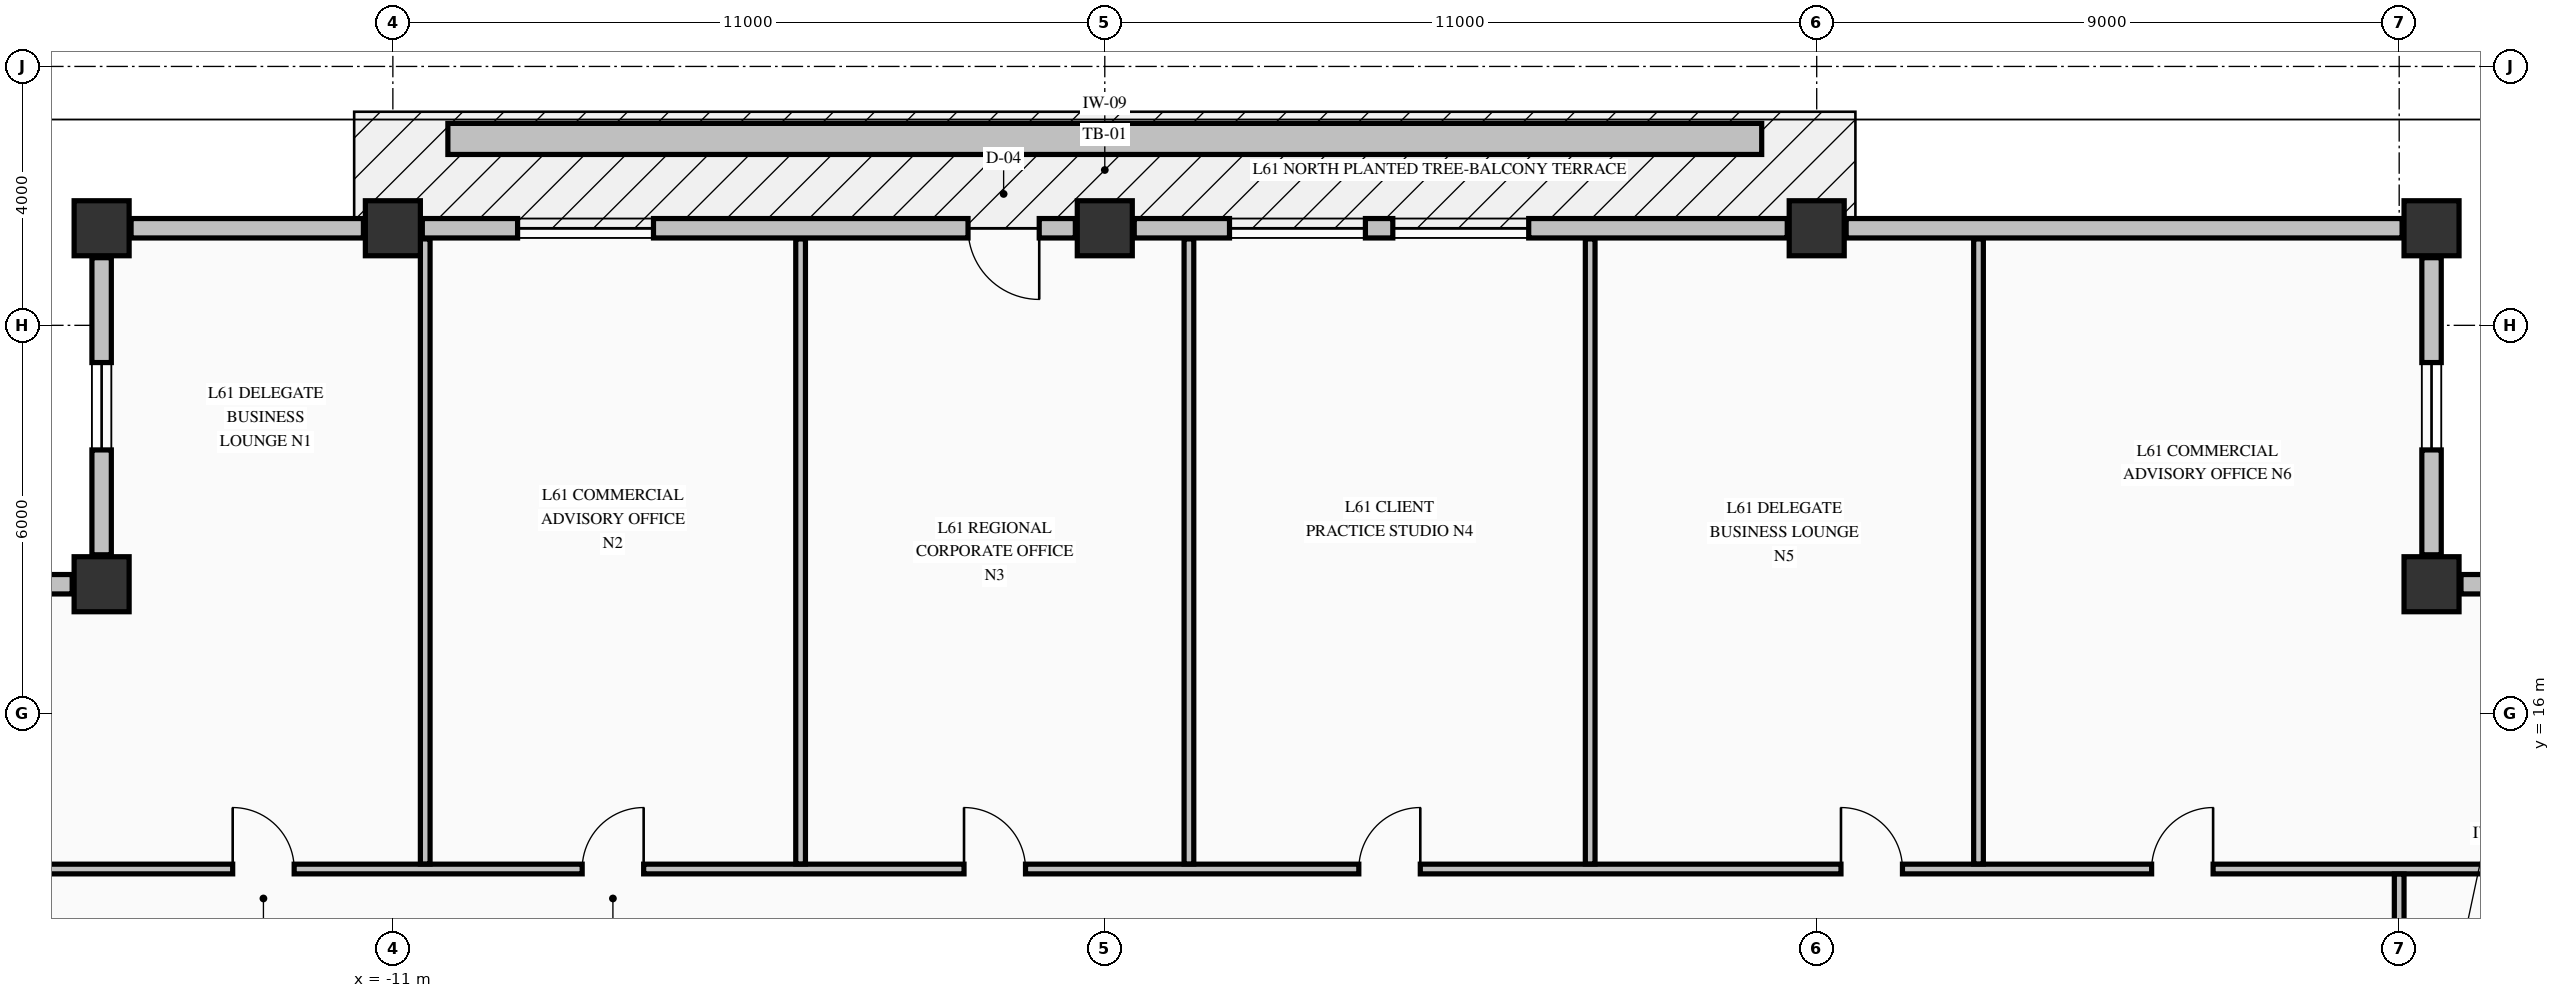
"""IFC4 building model, lengths in metres.
Left out: names, types, materials, properties, quantities, classifications, styles, units other than length and angle.
Written with IfcOpenShell. Run it as: python <this file> out.ifc"""

import sys

from ifc_helpers import new_model, si_unit, direction, frame, frame_2d, origin, origin_2d, place, context, subcontext, project, spatial, rectangle, extrude, element, fill, save


model = new_model("IFC4")
c1 = context("Model", 3, precision=1e-05, world=origin(), true_north=direction((0.0, 1.0)))
c2 = subcontext(c1, "Body", "Model", "MODEL_VIEW")
j1 = project(units=[si_unit("LENGTHUNIT", "METRE"), si_unit("PLANEANGLEUNIT", "RADIAN")], contexts=[c1])
p1 = place(None, origin())
s1 = spatial("IfcSite", under=j1, at=p1, CompositionType="ELEMENT")
p2 = place(p1, origin())
s2 = spatial("IfcBuilding", under=s1, at=p2, CompositionType="ELEMENT")
p3 = place(p2, frame((0.0, 0.0, 233.28)))
s3 = spatial("IfcBuildingStorey", under=s2, at=p3, CompositionType="ELEMENT", Elevation=233.28)
for number, where, z_axis, x_axis in (
    (1, (-15.5, 23.5, -0.25), (0.0, 0.0, 1.0), (1.0, 0.0, 0.0)),
    (2, (-11.0, 23.5, -0.25), (0.0, 0.0, 1.0), (1.0, 0.0, 0.0)),
    (3, (0.0, 23.5, -0.25), (0.0, 0.0, 1.0), (1.0, 0.0, 0.0)),
    (4, (11.0, 23.5, -0.25), (0.0, 0.0, 1.0), (1.0, 0.0, 0.0)),
    (5, (20.5, 23.5, -0.25), (0.0, 0.0, 1.0), (1.0, 0.0, 0.0)),
    (6, (20.5, 18.0, -0.25), (0.0, 0.0, 1.0), (1.0, 0.0, 0.0)),
    (7, (-15.5, 18.0, -0.25), (0.0, 0.0, 1.0), (1.0, 0.0, 0.0)),
):
    element("IfcColumn", number, at=place(p3, frame(where, z_axis=z_axis, x_axis=x_axis)), inside=s3, PredefinedType="COLUMN", context=c2, shape_type="SweptSolid", body=[
        extrude(rectangle(XDim=0.85, YDim=0.85, at=origin_2d()), origin(), (0.0, 0.0, 1.0), 3.23),
    ])
p4 = place(p3, frame((25.545, 18.0, 0.0), z_axis=(0.0, 0.0, 1.0), x_axis=(-1.0, 0.0, 0.0)))
e8 = element("IfcWall", 8, at=p4, inside=s3, PredefinedType="STANDARD", context=c2, shape_type="SweptSolid", body=[
    extrude(rectangle(XDim=4.59, YDim=0.3, at=frame_2d((2.295, 0.0))), origin(), (0.0, 0.0, 1.0), 2.372),
])
p5 = place(p4, frame((1.62, 0.0, 0.68)))
e9 = element("IfcOpeningElement", 9, at=p5, cuts=e8, PredefinedType="OPENING", context=c2, shape_type="SweptSolid", body=[
    extrude(rectangle(XDim=1.35, YDim=1.42, at=frame_2d((0.675, 0.71))), frame((0.0, 0.16, 0.0), z_axis=(0.0, -1.0, 0.0), x_axis=(1.0, 0.0, 0.0)), (0.0, 0.0, 1.0), 0.32),
])
p6 = place(p3, frame((20.5, 18.455, 0.0), z_axis=(0.0, 0.0, 1.0), x_axis=(0.0, 1.0, 0.0)))
e10 = element("IfcWall", 10, at=p6, inside=s3, PredefinedType="STANDARD", context=c2, shape_type="SweptSolid", body=[
    extrude(rectangle(XDim=4.59, YDim=0.3, at=frame_2d((2.295, 0.0))), origin(), (0.0, 0.0, 1.0), 2.372),
])
p7 = place(p6, frame((1.62, 0.0, 0.68)))
e11 = element("IfcOpeningElement", 11, at=p7, cuts=e10, PredefinedType="OPENING", context=c2, shape_type="SweptSolid", body=[
    extrude(rectangle(XDim=1.35, YDim=1.42, at=frame_2d((0.675, 0.71))), frame((0.0, 0.16, 0.0), z_axis=(0.0, -1.0, 0.0), x_axis=(1.0, 0.0, 0.0)), (0.0, 0.0, 1.0), 0.32),
])
p8 = place(p3, frame((-15.5, 23.045, 0.0), z_axis=(0.0, 0.0, 1.0), x_axis=(0.0, -1.0, 0.0)))
e12 = element("IfcWall", 12, at=p8, inside=s3, PredefinedType="STANDARD", context=c2, shape_type="SweptSolid", body=[
    extrude(rectangle(XDim=4.59, YDim=0.3, at=frame_2d((2.295, 0.0))), origin(), (0.0, 0.0, 1.0), 2.372),
])
p9 = place(p8, frame((1.62, 0.0, 0.68)))
e13 = element("IfcOpeningElement", 13, at=p9, cuts=e12, PredefinedType="OPENING", context=c2, shape_type="SweptSolid", body=[
    extrude(rectangle(XDim=1.35, YDim=1.42, at=frame_2d((0.675, 0.71))), frame((0.0, 0.16, 0.0), z_axis=(0.0, -1.0, 0.0), x_axis=(1.0, 0.0, 0.0)), (0.0, 0.0, 1.0), 0.32),
])
p10 = place(p3, frame((-15.955, 18.0, 0.0), z_axis=(0.0, 0.0, 1.0), x_axis=(-1.0, 0.0, 0.0)))
e14 = element("IfcWall", 14, at=p10, inside=s3, PredefinedType="STANDARD", context=c2, shape_type="SweptSolid", body=[
    extrude(rectangle(XDim=4.59, YDim=0.3, at=frame_2d((2.295, 0.0))), origin(), (0.0, 0.0, 1.0), 2.372),
])
p11 = place(p10, frame((1.62, 0.0, 0.68)))
e15 = element("IfcOpeningElement", 15, at=p11, cuts=e14, PredefinedType="OPENING", context=c2, shape_type="SweptSolid", body=[
    extrude(rectangle(XDim=1.35, YDim=1.42, at=frame_2d((0.675, 0.71))), frame((0.0, 0.16, 0.0), z_axis=(0.0, -1.0, 0.0), x_axis=(1.0, 0.0, 0.0)), (0.0, 0.0, 1.0), 0.32),
])
p12 = place(p3, frame((-11.455, 23.5, 0.0), z_axis=(0.0, 0.0, 1.0), x_axis=(-1.0, 0.0, 0.0)))
e16 = element("IfcWall", 16, at=p12, inside=s3, PredefinedType="STANDARD", context=c2, shape_type="SweptSolid", body=[
    extrude(rectangle(XDim=3.59, YDim=0.3, at=frame_2d((1.795, 0.0))), origin(), (0.0, 0.0, 1.0), 2.372),
])
p13 = place(p3, frame((-0.455, 23.5, 0.0), z_axis=(0.0, 0.0, 1.0), x_axis=(-1.0, 0.0, 0.0)))
e17 = element("IfcWall", 17, at=p13, inside=s3, PredefinedType="STANDARD", context=c2, shape_type="SweptSolid", body=[
    extrude(rectangle(XDim=10.09, YDim=0.3, at=frame_2d((5.045, 0.0))), origin(), (0.0, 0.0, 1.0), 2.372),
])
p14 = place(p13, frame((0.558, 0.0, 0.0)))
e18 = element("IfcOpeningElement", 18, at=p14, cuts=e17, PredefinedType="OPENING", context=c2, shape_type="SweptSolid", body=[
    extrude(rectangle(XDim=1.1, YDim=2.15, at=frame_2d((0.55, 1.075))), frame((0.0, 0.16, 0.0), z_axis=(0.0, -1.0, 0.0), x_axis=(1.0, 0.0, 0.0)), (0.0, 0.0, 1.0), 0.32),
])
p15 = place(p13, frame((6.518, 0.0, 0.7)))
e19 = element("IfcOpeningElement", 19, at=p15, cuts=e17, PredefinedType="OPENING", context=c2, shape_type="SweptSolid", body=[
    extrude(rectangle(XDim=2.1, YDim=1.5, at=frame_2d((1.05, 0.75))), frame((0.0, 0.16, 0.0), z_axis=(0.0, -1.0, 0.0), x_axis=(1.0, 0.0, 0.0)), (0.0, 0.0, 1.0), 0.32),
])
p16 = place(p3, frame((10.545, 23.5, 0.0), z_axis=(0.0, 0.0, 1.0), x_axis=(-1.0, 0.0, 0.0)))
e20 = element("IfcWall", 20, at=p16, inside=s3, PredefinedType="STANDARD", context=c2, shape_type="SweptSolid", body=[
    extrude(rectangle(XDim=10.09, YDim=0.3, at=frame_2d((5.045, 0.0))), origin(), (0.0, 0.0, 1.0), 2.372),
])
p17 = place(p16, frame((3.995, 0.0, 0.7)))
e21 = element("IfcOpeningElement", 21, at=p17, cuts=e20, PredefinedType="OPENING", context=c2, shape_type="SweptSolid", body=[
    extrude(rectangle(XDim=2.1, YDim=1.5, at=frame_2d((1.05, 0.75))), frame((0.0, 0.16, 0.0), z_axis=(0.0, -1.0, 0.0), x_axis=(1.0, 0.0, 0.0)), (0.0, 0.0, 1.0), 0.32),
])
p18 = place(p16, frame((6.518, 0.0, 0.7)))
e22 = element("IfcOpeningElement", 22, at=p18, cuts=e20, PredefinedType="OPENING", context=c2, shape_type="SweptSolid", body=[
    extrude(rectangle(XDim=2.1, YDim=1.5, at=frame_2d((1.05, 0.75))), frame((0.0, 0.16, 0.0), z_axis=(0.0, -1.0, 0.0), x_axis=(1.0, 0.0, 0.0)), (0.0, 0.0, 1.0), 0.32),
])
p19 = place(p3, frame((20.045, 23.5, 0.0), z_axis=(0.0, 0.0, 1.0), x_axis=(-1.0, 0.0, 0.0)))
e23 = element("IfcWall", 23, at=p19, inside=s3, PredefinedType="STANDARD", context=c2, shape_type="SweptSolid", body=[
    extrude(rectangle(XDim=8.59, YDim=0.3, at=frame_2d((4.295, 0.0))), origin(), (0.0, 0.0, 1.0), 2.372),
])
p20 = place(p3, frame((-20.075, 13.6, 0.0), z_axis=(0.0, 0.0, 1.0), x_axis=(1.0, 0.0, 0.0)))
e24 = element("IfcWall", 24, at=p20, inside=s3, PredefinedType="PARTITIONING", context=c2, shape_type="SweptSolid", body=[
    extrude(rectangle(XDim=45.91, YDim=0.15, at=frame_2d((22.955, 0.0))), origin(), (0.0, 0.0, 1.0), 2.98),
])
p21 = place(p20, frame((6.6, 0.0, 0.0)))
e25 = element("IfcOpeningElement", 25, at=p21, cuts=e24, PredefinedType="OPENING", context=c2, shape_type="SweptSolid", body=[
    extrude(rectangle(XDim=0.95, YDim=2.15, at=frame_2d((0.475, 1.075))), frame((0.0, 0.085, 0.0), z_axis=(0.0, -1.0, 0.0), x_axis=(1.0, 0.0, 0.0)), (0.0, 0.0, 1.0), 0.17),
])
p22 = place(p20, frame((12.0, 0.0, 0.0)))
e26 = element("IfcOpeningElement", 26, at=p22, cuts=e24, PredefinedType="OPENING", context=c2, shape_type="SweptSolid", body=[
    extrude(rectangle(XDim=0.95, YDim=2.15, at=frame_2d((0.475, 1.075))), frame((0.0, 0.085, 0.0), z_axis=(0.0, -1.0, 0.0), x_axis=(1.0, 0.0, 0.0)), (0.0, 0.0, 1.0), 0.17),
])
p23 = place(p20, frame((17.9, 0.0, 0.0)))
e27 = element("IfcOpeningElement", 27, at=p23, cuts=e24, PredefinedType="OPENING", context=c2, shape_type="SweptSolid", body=[
    extrude(rectangle(XDim=0.95, YDim=2.15, at=frame_2d((0.475, 1.075))), frame((0.0, 0.085, 0.0), z_axis=(0.0, -1.0, 0.0), x_axis=(1.0, 0.0, 0.0)), (0.0, 0.0, 1.0), 0.17),
])
p24 = place(p20, frame((24.0, 0.0, 0.0)))
e28 = element("IfcOpeningElement", 28, at=p24, cuts=e24, PredefinedType="OPENING", context=c2, shape_type="SweptSolid", body=[
    extrude(rectangle(XDim=0.95, YDim=2.15, at=frame_2d((0.475, 1.075))), frame((0.0, 0.085, 0.0), z_axis=(0.0, -1.0, 0.0), x_axis=(1.0, 0.0, 0.0)), (0.0, 0.0, 1.0), 0.17),
])
p25 = place(p20, frame((31.45, 0.0, 0.0)))
e29 = element("IfcOpeningElement", 29, at=p25, cuts=e24, PredefinedType="OPENING", context=c2, shape_type="SweptSolid", body=[
    extrude(rectangle(XDim=0.95, YDim=2.15, at=frame_2d((0.475, 1.075))), frame((0.0, 0.085, 0.0), z_axis=(0.0, -1.0, 0.0), x_axis=(1.0, 0.0, 0.0)), (0.0, 0.0, 1.0), 0.17),
])
p26 = place(p20, frame((36.25, 0.0, 0.0)))
e30 = element("IfcOpeningElement", 30, at=p26, cuts=e24, PredefinedType="OPENING", context=c2, shape_type="SweptSolid", body=[
    extrude(rectangle(XDim=0.95, YDim=2.15, at=frame_2d((0.475, 1.075))), frame((0.0, 0.085, 0.0), z_axis=(0.0, -1.0, 0.0), x_axis=(1.0, 0.0, 0.0)), (0.0, 0.0, 1.0), 0.17),
])
for number, where, z_axis, x_axis in (
    (31, (-10.5, 13.678, 0.0), (0.0, 0.0, 1.0), (0.0, 1.0, 0.0)),
    (32, (-4.7, 13.678, 0.0), (0.0, 0.0, 1.0), (0.0, 1.0, 0.0)),
    (33, (1.3, 13.678, 0.0), (0.0, 0.0, 1.0), (0.0, 1.0, 0.0)),
    (34, (7.5, 13.678, 0.0), (0.0, 0.0, 1.0), (0.0, 1.0, 0.0)),
    (35, (13.5, 13.678, 0.0), (0.0, 0.0, 1.0), (0.0, 1.0, 0.0)),
):
    element("IfcWall", number, at=place(p3, frame(where, z_axis=z_axis, x_axis=x_axis)), inside=s3, PredefinedType="PARTITIONING", context=c2, shape_type="SweptSolid", body=[
        extrude(rectangle(XDim=9.657, YDim=0.15, at=frame_2d((4.829, 0.0))), origin(), (0.0, 0.0, 1.0), 2.98),
    ])
p27 = place(p3, frame((20.0, 10.856, 0.0), z_axis=(0.0, 0.0, 1.0), x_axis=(0.0, 1.0, 0.0)))
e36 = element("IfcWall", 36, at=p27, inside=s3, PredefinedType="PARTITIONING", context=c2, shape_type="SweptSolid", body=[
    extrude(rectangle(XDim=2.666, YDim=0.15, at=frame_2d((1.333, 0.0))), origin(), (0.0, 0.0, 1.0), 2.98),
])
p28 = place(p27, frame((0.719, 0.0, 0.0)))
e37 = element("IfcOpeningElement", 37, at=p28, cuts=e36, PredefinedType="OPENING", context=c2, shape_type="SweptSolid", body=[
    extrude(rectangle(XDim=0.95, YDim=2.15, at=frame_2d((0.475, 1.075))), frame((0.0, 0.085, 0.0), z_axis=(0.0, -1.0, 0.0), x_axis=(1.0, 0.0, 0.0)), (0.0, 0.0, 1.0), 0.17),
])
p29 = place(p3, frame((-10.15, 24.88, -0.04), z_axis=(0.0, 0.0, 1.0), x_axis=(1.0, 0.0, 0.0)))
e38 = element("IfcWall", 38, at=p29, inside=s3, PredefinedType="PARAPET", context=c2, shape_type="SweptSolid", body=[
    extrude(rectangle(XDim=20.3, YDim=0.48, at=frame_2d((10.15, 0.0))), origin(), (0.0, 0.0, 1.0), 0.52),
])
p30 = place(p7, origin())
e39 = element("IfcWindow", 39, at=p30, inside=s3, PartitioningType="SINGLE_PANEL", PredefinedType="WINDOW", context=c2, shape_type="SweptSolid", body=[
    extrude(rectangle(XDim=1.35, YDim=1.42, at=frame_2d((0.675, 0.71))), frame((0.0, 0.03, 0.0), z_axis=(0.0, -1.0, 0.0), x_axis=(1.0, 0.0, 0.0)), (0.0, 0.0, 1.0), 0.06),
])
fill(e11, e39)
p31 = place(p9, origin())
e40 = element("IfcWindow", 40, at=p31, inside=s3, PartitioningType="SINGLE_PANEL", PredefinedType="WINDOW", context=c2, shape_type="SweptSolid", body=[
    extrude(rectangle(XDim=1.35, YDim=1.42, at=frame_2d((0.675, 0.71))), frame((0.0, 0.03, 0.0), z_axis=(0.0, -1.0, 0.0), x_axis=(1.0, 0.0, 0.0)), (0.0, 0.0, 1.0), 0.06),
])
fill(e13, e40)
p32 = place(p14, origin())
e41 = element("IfcDoor", 41, at=p32, inside=s3, OperationType="SINGLE_SWING_LEFT", PredefinedType="DOOR", context=c2, shape_type="SweptSolid", body=[
    extrude(rectangle(XDim=1.1, YDim=2.15, at=frame_2d((0.55, 1.075))), frame((0.0, 0.025, 0.0), z_axis=(0.0, -1.0, 0.0), x_axis=(1.0, 0.0, 0.0)), (0.0, 0.0, 1.0), 0.05),
])
fill(e18, e41)
p33 = place(p15, origin())
e42 = element("IfcWindow", 42, at=p33, inside=s3, PartitioningType="SINGLE_PANEL", PredefinedType="WINDOW", context=c2, shape_type="SweptSolid", body=[
    extrude(rectangle(XDim=2.1, YDim=1.5, at=frame_2d((1.05, 0.75))), frame((0.0, 0.03, 0.0), z_axis=(0.0, -1.0, 0.0), x_axis=(1.0, 0.0, 0.0)), (0.0, 0.0, 1.0), 0.06),
])
fill(e19, e42)
p34 = place(p17, origin())
e43 = element("IfcWindow", 43, at=p34, inside=s3, PartitioningType="SINGLE_PANEL", PredefinedType="WINDOW", context=c2, shape_type="SweptSolid", body=[
    extrude(rectangle(XDim=2.1, YDim=1.5, at=frame_2d((1.05, 0.75))), frame((0.0, 0.03, 0.0), z_axis=(0.0, -1.0, 0.0), x_axis=(1.0, 0.0, 0.0)), (0.0, 0.0, 1.0), 0.06),
])
fill(e21, e43)
p35 = place(p18, origin())
e44 = element("IfcWindow", 44, at=p35, inside=s3, PartitioningType="SINGLE_PANEL", PredefinedType="WINDOW", context=c2, shape_type="SweptSolid", body=[
    extrude(rectangle(XDim=2.1, YDim=1.5, at=frame_2d((1.05, 0.75))), frame((0.0, 0.03, 0.0), z_axis=(0.0, -1.0, 0.0), x_axis=(1.0, 0.0, 0.0)), (0.0, 0.0, 1.0), 0.06),
])
fill(e22, e44)
p36 = place(p21, origin())
e45 = element("IfcDoor", 45, at=p36, inside=s3, OperationType="SINGLE_SWING_LEFT", PredefinedType="DOOR", context=c2, shape_type="SweptSolid", body=[
    extrude(rectangle(XDim=0.95, YDim=2.15, at=frame_2d((0.475, 1.075))), frame((0.0, 0.025, 0.0), z_axis=(0.0, -1.0, 0.0), x_axis=(1.0, 0.0, 0.0)), (0.0, 0.0, 1.0), 0.05),
])
fill(e25, e45)
p37 = place(p22, origin())
e46 = element("IfcDoor", 46, at=p37, inside=s3, OperationType="SINGLE_SWING_RIGHT", PredefinedType="DOOR", context=c2, shape_type="SweptSolid", body=[
    extrude(rectangle(XDim=0.95, YDim=2.15, at=frame_2d((0.475, 1.075))), frame((0.0, 0.025, 0.0), z_axis=(0.0, -1.0, 0.0), x_axis=(1.0, 0.0, 0.0)), (0.0, 0.0, 1.0), 0.05),
])
fill(e26, e46)
p38 = place(p23, origin())
e47 = element("IfcDoor", 47, at=p38, inside=s3, OperationType="SINGLE_SWING_LEFT", PredefinedType="DOOR", context=c2, shape_type="SweptSolid", body=[
    extrude(rectangle(XDim=0.95, YDim=2.15, at=frame_2d((0.475, 1.075))), frame((0.0, 0.025, 0.0), z_axis=(0.0, -1.0, 0.0), x_axis=(1.0, 0.0, 0.0)), (0.0, 0.0, 1.0), 0.05),
])
fill(e27, e47)
p39 = place(p24, origin())
e48 = element("IfcDoor", 48, at=p39, inside=s3, OperationType="SINGLE_SWING_RIGHT", PredefinedType="DOOR", context=c2, shape_type="SweptSolid", body=[
    extrude(rectangle(XDim=0.95, YDim=2.15, at=frame_2d((0.475, 1.075))), frame((0.0, 0.025, 0.0), z_axis=(0.0, -1.0, 0.0), x_axis=(1.0, 0.0, 0.0)), (0.0, 0.0, 1.0), 0.05),
])
fill(e28, e48)
p40 = place(p25, origin())
e49 = element("IfcDoor", 49, at=p40, inside=s3, OperationType="SINGLE_SWING_LEFT", PredefinedType="DOOR", context=c2, shape_type="SweptSolid", body=[
    extrude(rectangle(XDim=0.95, YDim=2.15, at=frame_2d((0.475, 1.075))), frame((0.0, 0.025, 0.0), z_axis=(0.0, -1.0, 0.0), x_axis=(1.0, 0.0, 0.0)), (0.0, 0.0, 1.0), 0.05),
])
fill(e29, e49)
p41 = place(p26, origin())
e50 = element("IfcDoor", 50, at=p41, inside=s3, OperationType="SINGLE_SWING_RIGHT", PredefinedType="DOOR", context=c2, shape_type="SweptSolid", body=[
    extrude(rectangle(XDim=0.95, YDim=2.15, at=frame_2d((0.475, 1.075))), frame((0.0, 0.025, 0.0), z_axis=(0.0, -1.0, 0.0), x_axis=(1.0, 0.0, 0.0)), (0.0, 0.0, 1.0), 0.05),
])
fill(e30, e50)
save(model, sys.argv[1])
